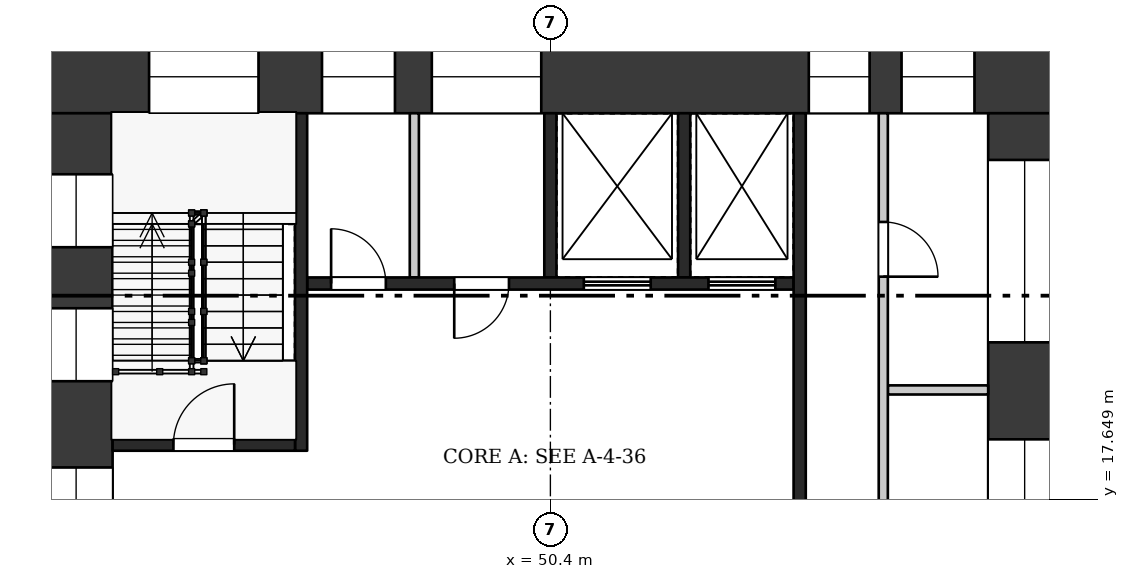
"""IFC4 building model, lengths in metres.
Left out: names, types, materials, properties, quantities, classifications, styles, units other than length and angle.
Written with IfcOpenShell. Run it as: python <this file> out.ifc"""

import sys

from ifc_helpers import new_model, si_unit, direction, frame, frame_2d, origin, origin_2d, place, context, subcontext, project, spatial, rectangle, extrude, element, fill, save


model = new_model("IFC4")
c1 = context("Model", 3, precision=1e-05, world=origin(), true_north=direction((0.0, 1.0)))
c2 = subcontext(c1, "Body", "Model", "MODEL_VIEW")
j1 = project(units=[si_unit("LENGTHUNIT", "METRE"), si_unit("PLANEANGLEUNIT", "RADIAN")], contexts=[c1])
p1 = place(None, origin())
s1 = spatial("IfcSite", under=j1, at=p1, CompositionType="ELEMENT")
p2 = place(p1, origin())
s2 = spatial("IfcBuilding", under=s1, at=p2, CompositionType="ELEMENT")
p3 = place(p2, frame((0.0, 0.0, 277.2)))
s3 = spatial("IfcBuildingStorey", under=s2, at=p3, CompositionType="ELEMENT", Elevation=277.2)
p4 = place(p3, frame((42.0, 24.6, 0.0), z_axis=(0.0, 0.0, 1.0), x_axis=(1.0, 0.0, 0.0)))
e1 = element("IfcWall", 1, at=p4, inside=s3, PredefinedType="SHEAR", context=c2, shape_type="SweptSolid", body=[
    extrude(rectangle(XDim=16.8, YDim=1.2, at=frame_2d((8.4, 0.0))), origin(), (0.0, 0.0, 1.0), 6.58),
])
p5 = place(p4, frame((1.8, 0.0, 0.5)))
e2 = element("IfcOpeningElement", 2, at=p5, cuts=e1, PredefinedType="OPENING", context=c2, shape_type="SweptSolid", body=[
    extrude(rectangle(XDim=1.8, YDim=2.4, at=frame_2d((0.9, 1.2))), frame((0.0, 0.61, 0.0), z_axis=(0.0, -1.0, 0.0), x_axis=(1.0, 0.0, 0.0)), (0.0, 0.0, 1.0), 1.22),
])
p6 = place(p4, frame((4.644, 0.0, 1.6)))
e3 = element("IfcOpeningElement", 3, at=p6, cuts=e1, PredefinedType="OPENING", context=c2, shape_type="SweptSolid", body=[
    extrude(rectangle(XDim=1.2, YDim=1.2, at=frame_2d((0.6, 0.6))), frame((0.0, 0.61, 0.0), z_axis=(0.0, -1.0, 0.0), x_axis=(1.0, 0.0, 0.0)), (0.0, 0.0, 1.0), 1.22),
])
p7 = place(p4, frame((6.45, 0.0, 1.6)))
e4 = element("IfcOpeningElement", 4, at=p7, cuts=e1, PredefinedType="OPENING", context=c2, shape_type="SweptSolid", body=[
    extrude(rectangle(XDim=1.8, YDim=1.2, at=frame_2d((0.9, 0.6))), frame((0.0, 0.61, 0.0), z_axis=(0.0, -1.0, 0.0), x_axis=(1.0, 0.0, 0.0)), (0.0, 0.0, 1.0), 1.22),
])
p8 = place(p4, frame((12.65, 0.0, 0.6)))
e5 = element("IfcOpeningElement", 5, at=p8, cuts=e1, PredefinedType="OPENING", context=c2, shape_type="SweptSolid", body=[
    extrude(rectangle(XDim=1.0, YDim=2.1, at=frame_2d((0.5, 1.05))), frame((0.0, 0.61, 0.0), z_axis=(0.0, -1.0, 0.0), x_axis=(1.0, 0.0, 0.0)), (0.0, 0.0, 1.0), 1.22),
])
p9 = place(p4, frame((14.175, 0.0, 1.6)))
e6 = element("IfcOpeningElement", 6, at=p9, cuts=e1, PredefinedType="OPENING", context=c2, shape_type="SweptSolid", body=[
    extrude(rectangle(XDim=1.2, YDim=1.2, at=frame_2d((0.6, 0.6))), frame((0.0, 0.61, 0.0), z_axis=(0.0, -1.0, 0.0), x_axis=(1.0, 0.0, 0.0)), (0.0, 0.0, 1.0), 1.22),
])
p10 = place(p3, frame((42.6, 9.6, 0.0), z_axis=(0.0, 0.0, 1.0), x_axis=(0.0, 1.0, 0.0)))
e7 = element("IfcWall", 7, at=p10, inside=s3, PredefinedType="SHEAR", context=c2, shape_type="SweptSolid", body=[
    extrude(rectangle(XDim=14.4, YDim=1.2, at=frame_2d((7.2, 0.0))), origin(), (0.0, 0.0, 1.0), 6.58),
])
p11 = place(p10, frame((2.1, 0.0, 0.0)))
e8 = element("IfcOpeningElement", 8, at=p11, cuts=e7, PredefinedType="OPENING", context=c2, shape_type="SweptSolid", body=[
    extrude(rectangle(XDim=1.8, YDim=2.1, at=frame_2d((0.9, 1.05))), frame((0.0, 0.61, 0.0), z_axis=(0.0, -1.0, 0.0), x_axis=(1.0, 0.0, 0.0)), (0.0, 0.0, 1.0), 1.22),
])
p12 = place(p10, frame((5.575, 0.0, 0.6)))
e9 = element("IfcOpeningElement", 9, at=p12, cuts=e7, PredefinedType="OPENING", context=c2, shape_type="SweptSolid", body=[
    extrude(rectangle(XDim=3.0, YDim=2.1, at=frame_2d((1.5, 1.05))), frame((0.0, 0.61, 0.0), z_axis=(0.0, -1.0, 0.0), x_axis=(1.0, 0.0, 0.0)), (0.0, 0.0, 1.0), 1.22),
])
p13 = place(p10, frame((9.993, 0.0, 0.5)))
e10 = element("IfcOpeningElement", 10, at=p13, cuts=e7, PredefinedType="OPENING", context=c2, shape_type="SweptSolid", body=[
    extrude(rectangle(XDim=1.2, YDim=2.4, at=frame_2d((0.6, 1.2))), frame((0.0, 0.61, 0.0), z_axis=(0.0, -1.0, 0.0), x_axis=(1.0, 0.0, 0.0)), (0.0, 0.0, 1.0), 1.22),
])
p14 = place(p10, frame((12.197, 0.0, 0.5)))
e11 = element("IfcOpeningElement", 11, at=p14, cuts=e7, PredefinedType="OPENING", context=c2, shape_type="SweptSolid", body=[
    extrude(rectangle(XDim=1.2, YDim=2.4, at=frame_2d((0.6, 1.2))), frame((0.0, 0.61, 0.0), z_axis=(0.0, -1.0, 0.0), x_axis=(1.0, 0.0, 0.0)), (0.0, 0.0, 1.0), 1.22),
])
p15 = place(p3, frame((58.2, 9.6, 0.0), z_axis=(0.0, 0.0, 1.0), x_axis=(0.0, 1.0, 0.0)))
e12 = element("IfcWall", 12, at=p15, inside=s3, PredefinedType="SHEAR", context=c2, shape_type="SweptSolid", body=[
    extrude(rectangle(XDim=14.4, YDim=1.2, at=frame_2d((7.2, 0.0))), origin(), (0.0, 0.0, 1.0), 6.58),
])
p16 = place(p15, frame((1.105, 0.0, 0.6)))
e13 = element("IfcOpeningElement", 13, at=p16, cuts=e12, PredefinedType="OPENING", context=c2, shape_type="SweptSolid", body=[
    extrude(rectangle(XDim=3.0, YDim=2.1, at=frame_2d((1.5, 1.05))), frame((0.0, 0.61, 0.0), z_axis=(0.0, -1.0, 0.0), x_axis=(1.0, 0.0, 0.0)), (0.0, 0.0, 1.0), 1.22),
])
p17 = place(p15, frame((6.038, 0.0, 1.6)))
e14 = element("IfcOpeningElement", 14, at=p17, cuts=e12, PredefinedType="OPENING", context=c2, shape_type="SweptSolid", body=[
    extrude(rectangle(XDim=3.0, YDim=1.2, at=frame_2d((1.5, 0.6))), frame((0.0, 0.61, 0.0), z_axis=(0.0, -1.0, 0.0), x_axis=(1.0, 0.0, 0.0)), (0.0, 0.0, 1.0), 1.22),
])
p18 = place(p15, frame((10.633, 0.0, 1.6)))
e15 = element("IfcOpeningElement", 15, at=p18, cuts=e12, PredefinedType="OPENING", context=c2, shape_type="SweptSolid", body=[
    extrude(rectangle(XDim=3.0, YDim=1.2, at=frame_2d((1.5, 0.6))), frame((0.0, 0.61, 0.0), z_axis=(0.0, -1.0, 0.0), x_axis=(1.0, 0.0, 0.0)), (0.0, 0.0, 1.0), 1.22),
])
for number, where, z_axis, x_axis in (
    (16, (50.4, 21.3, 0.0), (0.0, 0.0, 1.0), (0.0, 1.0, 0.0)),
    (17, (52.6, 21.3, 0.0), (0.0, 0.0, 1.0), (0.0, 1.0, 0.0)),
):
    element("IfcWall", number, at=place(p3, frame(where, z_axis=z_axis, x_axis=x_axis)), inside=s3, PredefinedType="SHEAR", context=c2, shape_type="SweptSolid", body=[
        extrude(rectangle(XDim=2.7, YDim=0.2, at=frame_2d((1.35, 0.0))), origin(), (0.0, 0.0, 1.0), 6.58),
    ])
p19 = place(p3, frame((48.163, 21.3, 0.0), z_axis=(0.0, 0.0, 1.0), x_axis=(0.0, 1.0, 0.0)))
e18 = element("IfcWall", 18, at=p19, inside=s3, PredefinedType="PARTITIONING", context=c2, shape_type="SweptSolid", body=[
    extrude(rectangle(XDim=2.7, YDim=0.15, at=frame_2d((1.35, 0.0))), origin(), (0.0, 0.0, 1.0), 6.58),
])
p20 = place(p3, frame((46.4, 21.2, 0.0), z_axis=(0.0, 0.0, 1.0), x_axis=(1.0, 0.0, 0.0)))
e19 = element("IfcWall", 19, at=p20, inside=s3, PredefinedType="SHEAR", context=c2, shape_type="SweptSolid", body=[
    extrude(rectangle(XDim=8.0, YDim=0.2, at=frame_2d((4.0, 0.0))), origin(), (0.0, 0.0, 1.0), 6.58),
])
p21 = place(p20, frame((0.394, 0.0, 0.0)))
e20 = element("IfcOpeningElement", 20, at=p21, cuts=e19, PredefinedType="OPENING", context=c2, shape_type="SweptSolid", body=[
    extrude(rectangle(XDim=0.9, YDim=2.1, at=frame_2d((0.45, 1.05))), frame((0.0, 0.11, 0.0), z_axis=(0.0, -1.0, 0.0), x_axis=(1.0, 0.0, 0.0)), (0.0, 0.0, 1.0), 0.22),
])
p22 = place(p20, frame((2.419, 0.0, 0.0)))
e21 = element("IfcOpeningElement", 21, at=p22, cuts=e19, PredefinedType="OPENING", context=c2, shape_type="SweptSolid", body=[
    extrude(rectangle(XDim=0.9, YDim=2.1, at=frame_2d((0.45, 1.05))), frame((0.0, 0.11, 0.0), z_axis=(0.0, -1.0, 0.0), x_axis=(1.0, 0.0, 0.0)), (0.0, 0.0, 1.0), 0.22),
])
p23 = place(p20, frame((4.55, 0.0, 0.0)))
e22 = element("IfcOpeningElement", 22, at=p23, cuts=e19, PredefinedType="OPENING", context=c2, shape_type="SweptSolid", body=[
    extrude(rectangle(XDim=1.1, YDim=2.1, at=frame_2d((0.55, 1.05))), frame((0.0, 0.11, 0.0), z_axis=(0.0, -1.0, 0.0), x_axis=(1.0, 0.0, 0.0)), (0.0, 0.0, 1.0), 0.22),
])
p24 = place(p20, frame((6.6, 0.0, 0.0)))
e23 = element("IfcOpeningElement", 23, at=p24, cuts=e19, PredefinedType="OPENING", context=c2, shape_type="SweptSolid", body=[
    extrude(rectangle(XDim=1.1, YDim=2.1, at=frame_2d((0.55, 1.05))), frame((0.0, 0.11, 0.0), z_axis=(0.0, -1.0, 0.0), x_axis=(1.0, 0.0, 0.0)), (0.0, 0.0, 1.0), 0.22),
])
p25 = place(p3, frame((46.3, 18.45, 0.0), z_axis=(0.0, 0.0, 1.0), x_axis=(0.0, 1.0, 0.0)))
e24 = element("IfcWall", 24, at=p25, inside=s3, PredefinedType="SHEAR", context=c2, shape_type="SweptSolid", body=[
    extrude(rectangle(XDim=5.55, YDim=0.2, at=frame_2d((2.775, 0.0))), origin(), (0.0, 0.0, 1.0), 6.58),
])
p26 = place(p3, frame((43.2, 18.55, 0.0), z_axis=(0.0, 0.0, 1.0), x_axis=(1.0, 0.0, 0.0)))
e25 = element("IfcWall", 25, at=p26, inside=s3, PredefinedType="SHEAR", context=c2, shape_type="SweptSolid", body=[
    extrude(rectangle(XDim=3.0, YDim=0.2, at=frame_2d((1.5, 0.0))), origin(), (0.0, 0.0, 1.0), 6.58),
])
p27 = place(p26, frame((1.0, 0.0, 0.0)))
e26 = element("IfcOpeningElement", 26, at=p27, cuts=e25, PredefinedType="OPENING", context=c2, shape_type="SweptSolid", body=[
    extrude(rectangle(XDim=1.0, YDim=2.1, at=frame_2d((0.5, 1.05))), frame((0.0, 0.11, 0.0), z_axis=(0.0, -1.0, 0.0), x_axis=(1.0, 0.0, 0.0)), (0.0, 0.0, 1.0), 0.22),
])
p28 = place(p3, frame((54.5, 14.75, 0.0), z_axis=(0.0, 0.0, 1.0), x_axis=(0.0, 1.0, 0.0)))
e27 = element("IfcWall", 27, at=p28, inside=s3, PredefinedType="SHEAR", context=c2, shape_type="SweptSolid", body=[
    extrude(rectangle(XDim=9.25, YDim=0.2, at=frame_2d((4.625, 0.0))), origin(), (0.0, 0.0, 1.0), 6.58),
])
p29 = place(p3, frame((55.95, 19.45, 0.0), z_axis=(0.0, 0.0, 1.0), x_axis=(1.0, 0.0, 0.0)))
e28 = element("IfcWall", 28, at=p29, inside=s3, PredefinedType="PARTITIONING", context=c2, shape_type="SweptSolid", body=[
    extrude(rectangle(XDim=1.65, YDim=0.15, at=frame_2d((0.825, 0.0))), origin(), (0.0, 0.0, 1.0), 6.58),
])
p30 = place(p3, frame((55.875, 14.9, 0.0), z_axis=(0.0, 0.0, 1.0), x_axis=(0.0, 1.0, 0.0)))
e29 = element("IfcWall", 29, at=p30, inside=s3, PredefinedType="PARTITIONING", context=c2, shape_type="SweptSolid", body=[
    extrude(rectangle(XDim=9.1, YDim=0.15, at=frame_2d((4.55, 0.0))), origin(), (0.0, 0.0, 1.0), 6.58),
])
p31 = place(p30, frame((1.788, 0.0, 0.0)))
e30 = element("IfcOpeningElement", 30, at=p31, cuts=e29, PredefinedType="OPENING", context=c2, shape_type="SweptSolid", body=[
    extrude(rectangle(XDim=0.9, YDim=2.1, at=frame_2d((0.45, 1.05))), frame((0.0, 0.085, 0.0), z_axis=(0.0, -1.0, 0.0), x_axis=(1.0, 0.0, 0.0)), (0.0, 0.0, 1.0), 0.17),
])
p32 = place(p30, frame((6.413, 0.0, 0.0)))
e31 = element("IfcOpeningElement", 31, at=p32, cuts=e29, PredefinedType="OPENING", context=c2, shape_type="SweptSolid", body=[
    extrude(rectangle(XDim=0.9, YDim=2.1, at=frame_2d((0.45, 1.05))), frame((0.0, 0.085, 0.0), z_axis=(0.0, -1.0, 0.0), x_axis=(1.0, 0.0, 0.0)), (0.0, 0.0, 1.0), 0.17),
])
p33 = place(p21, origin())
e32 = element("IfcDoor", 32, at=p33, inside=s3, OperationType="SINGLE_SWING_LEFT", PredefinedType="DOOR", context=c2, shape_type="SweptSolid", body=[
    extrude(rectangle(XDim=0.9, YDim=2.1, at=frame_2d((0.45, 1.05))), frame((0.0, 0.025, 0.0), z_axis=(0.0, -1.0, 0.0), x_axis=(1.0, 0.0, 0.0)), (0.0, 0.0, 1.0), 0.05),
])
fill(e20, e32)
p34 = place(p22, frame((0.9, 0.0, 0.0), z_axis=(0.0, 0.0, 1.0), x_axis=(-1.0, 0.0, 0.0)))
e33 = element("IfcDoor", 33, at=p34, inside=s3, OperationType="SINGLE_SWING_RIGHT", PredefinedType="DOOR", context=c2, shape_type="SweptSolid", body=[
    extrude(rectangle(XDim=0.9, YDim=2.1, at=frame_2d((0.45, 1.05))), frame((0.0, 0.025, 0.0), z_axis=(0.0, -1.0, 0.0), x_axis=(1.0, 0.0, 0.0)), (0.0, 0.0, 1.0), 0.05),
])
fill(e21, e33)
p35 = place(p23, origin())
e34 = element("IfcDoor", 34, at=p35, inside=s3, OperationType="DOUBLE_DOOR_SLIDING", PredefinedType="DOOR", context=c2, shape_type="SweptSolid", body=[
    extrude(rectangle(XDim=1.1, YDim=2.1, at=frame_2d((0.55, 1.05))), frame((0.0, 0.025, 0.0), z_axis=(0.0, -1.0, 0.0), x_axis=(1.0, 0.0, 0.0)), (0.0, 0.0, 1.0), 0.05),
])
fill(e22, e34)
p36 = place(p24, origin())
e35 = element("IfcDoor", 35, at=p36, inside=s3, OperationType="DOUBLE_DOOR_SLIDING", PredefinedType="DOOR", context=c2, shape_type="SweptSolid", body=[
    extrude(rectangle(XDim=1.1, YDim=2.1, at=frame_2d((0.55, 1.05))), frame((0.0, 0.025, 0.0), z_axis=(0.0, -1.0, 0.0), x_axis=(1.0, 0.0, 0.0)), (0.0, 0.0, 1.0), 0.05),
])
fill(e23, e35)
p37 = place(p27, origin())
e36 = element("IfcDoor", 36, at=p37, inside=s3, OperationType="SINGLE_SWING_RIGHT", PredefinedType="DOOR", context=c2, shape_type="SweptSolid", body=[
    extrude(rectangle(XDim=1.0, YDim=2.1, at=frame_2d((0.5, 1.05))), frame((0.0, 0.025, 0.0), z_axis=(0.0, -1.0, 0.0), x_axis=(1.0, 0.0, 0.0)), (0.0, 0.0, 1.0), 0.05),
])
fill(e26, e36)
p38 = place(p32, frame((0.9, 0.0, 0.0), z_axis=(0.0, 0.0, 1.0), x_axis=(-1.0, 0.0, 0.0)))
e37 = element("IfcDoor", 37, at=p38, inside=s3, OperationType="SINGLE_SWING_RIGHT", PredefinedType="DOOR", context=c2, shape_type="SweptSolid", body=[
    extrude(rectangle(XDim=0.9, YDim=2.1, at=frame_2d((0.45, 1.05))), frame((0.0, 0.025, 0.0), z_axis=(0.0, -1.0, 0.0), x_axis=(1.0, 0.0, 0.0)), (0.0, 0.0, 1.0), 0.05),
])
fill(e31, e37)
p39 = place(p5, origin())
e38 = element("IfcWindow", 38, at=p39, inside=s3, PartitioningType="SINGLE_PANEL", PredefinedType="WINDOW", context=c2, shape_type="SweptSolid", body=[
    extrude(rectangle(XDim=1.8, YDim=2.4, at=frame_2d((0.9, 1.2))), frame((0.0, 0.03, 0.0), z_axis=(0.0, -1.0, 0.0), x_axis=(1.0, 0.0, 0.0)), (0.0, 0.0, 1.0), 0.06),
])
fill(e2, e38)
p40 = place(p6, origin())
e39 = element("IfcWindow", 39, at=p40, inside=s3, PartitioningType="SINGLE_PANEL", PredefinedType="WINDOW", context=c2, shape_type="SweptSolid", body=[
    extrude(rectangle(XDim=1.2, YDim=1.2, at=frame_2d((0.6, 0.6))), frame((0.0, 0.03, 0.0), z_axis=(0.0, -1.0, 0.0), x_axis=(1.0, 0.0, 0.0)), (0.0, 0.0, 1.0), 0.06),
])
fill(e3, e39)
p41 = place(p7, origin())
e40 = element("IfcWindow", 40, at=p41, inside=s3, PartitioningType="SINGLE_PANEL", PredefinedType="WINDOW", context=c2, shape_type="SweptSolid", body=[
    extrude(rectangle(XDim=1.8, YDim=1.2, at=frame_2d((0.9, 0.6))), frame((0.0, 0.03, 0.0), z_axis=(0.0, -1.0, 0.0), x_axis=(1.0, 0.0, 0.0)), (0.0, 0.0, 1.0), 0.06),
])
fill(e4, e40)
p42 = place(p8, origin())
e41 = element("IfcWindow", 41, at=p42, inside=s3, PartitioningType="SINGLE_PANEL", PredefinedType="WINDOW", context=c2, shape_type="SweptSolid", body=[
    extrude(rectangle(XDim=1.0, YDim=2.1, at=frame_2d((0.5, 1.05))), frame((0.0, 0.03, 0.0), z_axis=(0.0, -1.0, 0.0), x_axis=(1.0, 0.0, 0.0)), (0.0, 0.0, 1.0), 0.06),
])
fill(e5, e41)
p43 = place(p9, origin())
e42 = element("IfcWindow", 42, at=p43, inside=s3, PartitioningType="SINGLE_PANEL", PredefinedType="WINDOW", context=c2, shape_type="SweptSolid", body=[
    extrude(rectangle(XDim=1.2, YDim=1.2, at=frame_2d((0.6, 0.6))), frame((0.0, 0.03, 0.0), z_axis=(0.0, -1.0, 0.0), x_axis=(1.0, 0.0, 0.0)), (0.0, 0.0, 1.0), 0.06),
])
fill(e6, e42)
p44 = place(p12, origin())
e43 = element("IfcWindow", 43, at=p44, inside=s3, PartitioningType="SINGLE_PANEL", PredefinedType="WINDOW", context=c2, shape_type="SweptSolid", body=[
    extrude(rectangle(XDim=3.0, YDim=2.1, at=frame_2d((1.5, 1.05))), frame((0.0, 0.03, 0.0), z_axis=(0.0, -1.0, 0.0), x_axis=(1.0, 0.0, 0.0)), (0.0, 0.0, 1.0), 0.06),
])
fill(e9, e43)
p45 = place(p13, origin())
e44 = element("IfcWindow", 44, at=p45, inside=s3, PartitioningType="SINGLE_PANEL", PredefinedType="WINDOW", context=c2, shape_type="SweptSolid", body=[
    extrude(rectangle(XDim=1.2, YDim=2.4, at=frame_2d((0.6, 1.2))), frame((0.0, 0.03, 0.0), z_axis=(0.0, -1.0, 0.0), x_axis=(1.0, 0.0, 0.0)), (0.0, 0.0, 1.0), 0.06),
])
fill(e10, e44)
p46 = place(p14, origin())
e45 = element("IfcWindow", 45, at=p46, inside=s3, PartitioningType="SINGLE_PANEL", PredefinedType="WINDOW", context=c2, shape_type="SweptSolid", body=[
    extrude(rectangle(XDim=1.2, YDim=2.4, at=frame_2d((0.6, 1.2))), frame((0.0, 0.03, 0.0), z_axis=(0.0, -1.0, 0.0), x_axis=(1.0, 0.0, 0.0)), (0.0, 0.0, 1.0), 0.06),
])
fill(e11, e45)
p47 = place(p17, origin())
e46 = element("IfcWindow", 46, at=p47, inside=s3, PartitioningType="SINGLE_PANEL", PredefinedType="WINDOW", context=c2, shape_type="SweptSolid", body=[
    extrude(rectangle(XDim=3.0, YDim=1.2, at=frame_2d((1.5, 0.6))), frame((0.0, 0.03, 0.0), z_axis=(0.0, -1.0, 0.0), x_axis=(1.0, 0.0, 0.0)), (0.0, 0.0, 1.0), 0.06),
])
fill(e14, e46)
p48 = place(p18, origin())
e47 = element("IfcWindow", 47, at=p48, inside=s3, PartitioningType="SINGLE_PANEL", PredefinedType="WINDOW", context=c2, shape_type="SweptSolid", body=[
    extrude(rectangle(XDim=3.0, YDim=1.2, at=frame_2d((1.5, 0.6))), frame((0.0, 0.03, 0.0), z_axis=(0.0, -1.0, 0.0), x_axis=(1.0, 0.0, 0.0)), (0.0, 0.0, 1.0), 0.06),
])
fill(e15, e47)
p49 = place(p2, frame((0.0, 0.0, 287.45)))
p50 = place(p49, frame((0.0, 0.0, 1.95)))
p51 = place(p50, frame((53.55, 22.65, 0.0)))
p52 = place(p51, frame((0.0, 0.0, 0.2)))
e48 = element("IfcWindow", 48, at=p52, inside=s3, PartitioningType="SINGLE_PANEL", PredefinedType="SKYLIGHT", context=c2, shape_type="SweptSolid", body=[
    extrude(rectangle(XDim=0.9, YDim=0.9, at=origin_2d()), origin(), (0.0, 0.0, 1.0), 0.05),
])
save(model, sys.argv[1])
